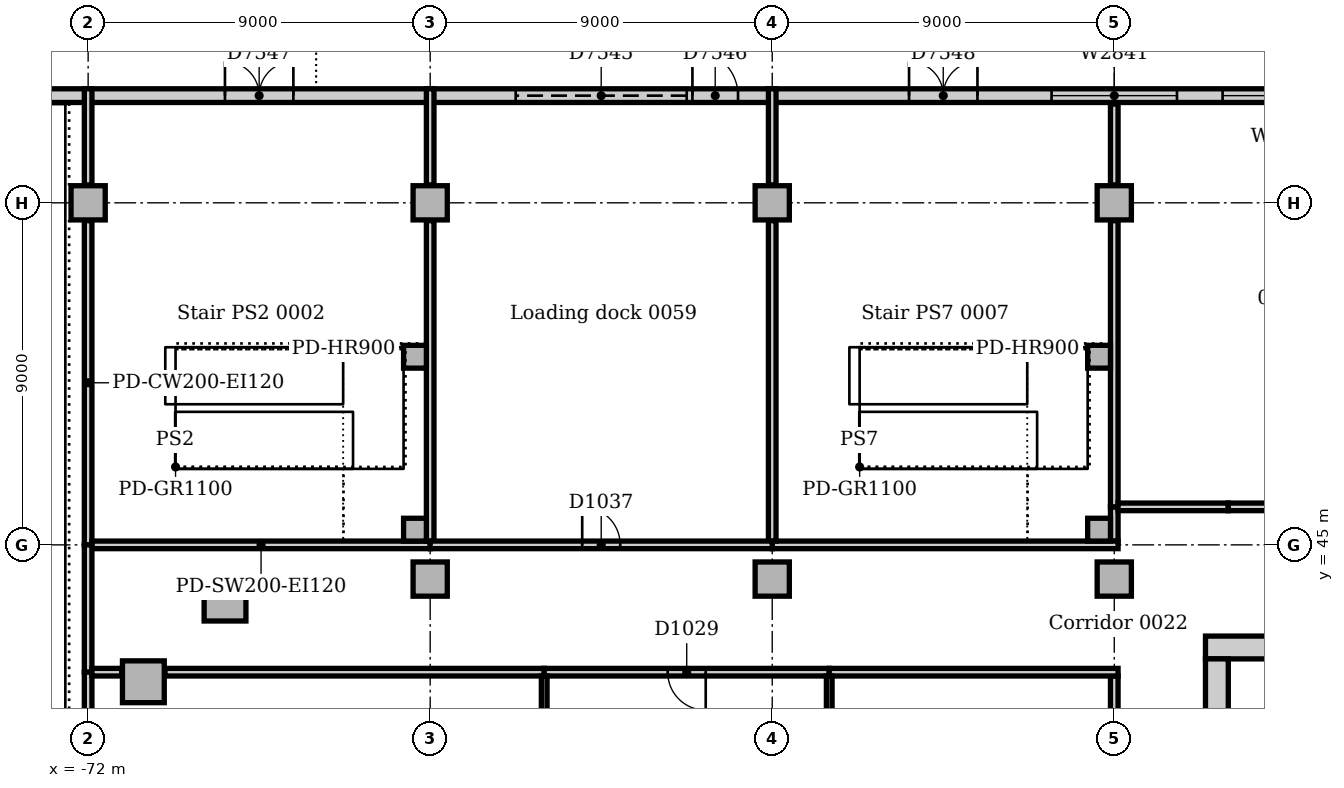
"""IFC4 building model, lengths in metres.
Left out: names, types, materials, properties, quantities, classifications, styles, units other than length and angle.
Written with IfcOpenShell. Run it as: python <this file> out.ifc"""

import sys

from ifc_helpers import new_model, si_unit, direction, frame, frame_2d, origin, origin_2d, place, context, subcontext, project, spatial, rectangle, extrude, element, fill, save


model = new_model("IFC4")
c1 = context("Model", 3, precision=1e-05, world=origin(), true_north=direction((0.0, 1.0)))
c2 = subcontext(c1, "Body", "Model", "MODEL_VIEW")
j1 = project(units=[si_unit("LENGTHUNIT", "METRE"), si_unit("PLANEANGLEUNIT", "RADIAN")], contexts=[c1])
p1 = place(None, origin())
s1 = spatial("IfcSite", under=j1, at=p1, CompositionType="ELEMENT")
p2 = place(p1, origin())
s2 = spatial("IfcBuilding", under=s1, at=p2, CompositionType="ELEMENT")
p3 = place(p2, origin())
s3 = spatial("IfcBuildingStorey", under=s2, at=p3, CompositionType="ELEMENT", Elevation=0.0)
p4 = place(p3, frame((-30.9, 42.3, 0.0), z_axis=(0.0, 0.0, 1.0), x_axis=(-1.0, 0.0, 0.0)))
e1 = element("IfcWall", 1, at=p4, inside=s3, PredefinedType="SOLIDWALL", context=c2, shape_type="SweptSolid", body=[
    extrude(rectangle(XDim=11.7, YDim=0.6, at=frame_2d((5.85, 0.0))), origin(), (0.0, 0.0, 1.0), 6.0),
])
p5 = place(p3, frame((-42.3, 42.0, 0.0), z_axis=(0.0, 0.0, 1.0), x_axis=(0.0, -1.0, 0.0)))
e2 = element("IfcWall", 2, at=p5, inside=s3, PredefinedType="SOLIDWALL", context=c2, shape_type="SweptSolid", body=[
    extrude(rectangle(XDim=11.5, YDim=0.6, at=frame_2d((5.75, 0.0))), origin(), (0.0, 0.0, 1.0), 6.0),
])
p6 = place(p5, frame((8.85, 0.0, 0.0)))
e3 = element("IfcOpeningElement", 3, at=p6, cuts=e2, PredefinedType="OPENING", context=c2, shape_type="SweptSolid", body=[
    extrude(rectangle(XDim=1.8, YDim=2.1, at=frame_2d((0.9, 1.05))), frame((0.0, 0.31, 0.0), z_axis=(0.0, -1.0, 0.0), x_axis=(1.0, 0.0, 0.0)), (0.0, 0.0, 1.0), 0.62),
])
for number, where, z_axis, x_axis in (
    (4, (-68.398, 43.547, 0.0), (0.0, 0.0, 1.0), (1.0, 0.0, 0.0)),
    (5, (-70.547, 41.398, 0.0), (0.0, 0.0, 1.0), (1.0, 0.0, 0.0)),
):
    element("IfcColumn", number, at=place(p3, frame(where, z_axis=z_axis, x_axis=x_axis)), inside=s3, PredefinedType="COLUMN", context=c2, shape_type="SweptSolid", body=[
        extrude(rectangle(XDim=1.1, YDim=1.1, at=origin_2d()), origin(), (0.0, 0.0, 1.0), 5.7),
    ])
for number, where, z_axis, x_axis in (
    (6, (-63.0, 44.1, 0.0), (0.0, 0.0, 1.0), (1.0, 0.0, 0.0)),
    (7, (-54.0, 44.1, 0.0), (0.0, 0.0, 1.0), (1.0, 0.0, 0.0)),
    (8, (-45.0, 44.1, 0.0), (0.0, 0.0, 1.0), (1.0, 0.0, 0.0)),
    (9, (-72.0, 54.0, 0.0), (0.0, 0.0, 1.0), (1.0, 0.0, 0.0)),
    (10, (-63.0, 54.0, 0.0), (0.0, 0.0, 1.0), (1.0, 0.0, 0.0)),
    (11, (-54.0, 54.0, 0.0), (0.0, 0.0, 1.0), (1.0, 0.0, 0.0)),
    (12, (-45.0, 54.0, 0.0), (0.0, 0.0, 1.0), (1.0, 0.0, 0.0)),
):
    element("IfcColumn", number, at=place(p3, frame(where, z_axis=z_axis, x_axis=x_axis)), inside=s3, PredefinedType="COLUMN", context=c2, shape_type="SweptSolid", body=[
        extrude(rectangle(XDim=0.9, YDim=0.9, at=origin_2d()), origin(), (0.0, 0.0, 1.0), 5.7),
    ])
p7 = place(p3, frame((3.4, 56.82, 0.0), z_axis=(0.0, 0.0, 1.0), x_axis=(-1.0, 0.0, 0.0)))
e13 = element("IfcWall", 13, at=p7, inside=s3, PredefinedType="STANDARD", context=c2, shape_type="SweptSolid", body=[
    extrude(rectangle(XDim=84.4, YDim=0.36, at=frame_2d((42.2, 0.0))), origin(), (0.0, 0.0, 1.0), 5.7),
])
p8 = place(p7, frame((15.7, 0.0, 0.0)))
e14 = element("IfcOpeningElement", 14, at=p8, cuts=e13, PredefinedType="OPENING", context=c2, shape_type="SweptSolid", body=[
    extrude(rectangle(XDim=2.4, YDim=2.4, at=frame_2d((1.2, 1.2))), frame((0.0, 0.19, 0.0), z_axis=(0.0, -1.0, 0.0), x_axis=(1.0, 0.0, 0.0)), (0.0, 0.0, 1.0), 0.38),
])
p9 = place(p7, frame((76.6, 0.0, 0.0)))
e15 = element("IfcOpeningElement", 15, at=p9, cuts=e13, PredefinedType="OPENING", context=c2, shape_type="SweptSolid", body=[
    extrude(rectangle(XDim=6.6, YDim=4.2, at=frame_2d((3.3, 2.1))), frame((0.0, 0.19, 0.0), z_axis=(0.0, -1.0, 0.0), x_axis=(1.0, 0.0, 0.0)), (0.0, 0.0, 1.0), 0.38),
])
p10 = place(p7, frame((59.65, 0.0, 0.0)))
e16 = element("IfcOpeningElement", 16, at=p10, cuts=e13, PredefinedType="OPENING", context=c2, shape_type="SweptSolid", body=[
    extrude(rectangle(XDim=4.5, YDim=4.2, at=frame_2d((2.25, 2.1))), frame((0.0, 0.19, 0.0), z_axis=(0.0, -1.0, 0.0), x_axis=(1.0, 0.0, 0.0)), (0.0, 0.0, 1.0), 0.38),
])
p11 = place(p7, frame((58.3, 0.0, 0.0)))
e17 = element("IfcOpeningElement", 17, at=p11, cuts=e13, PredefinedType="OPENING", context=c2, shape_type="SweptSolid", body=[
    extrude(rectangle(XDim=1.2, YDim=2.2, at=frame_2d((0.6, 1.1))), frame((0.0, 0.19, 0.0), z_axis=(0.0, -1.0, 0.0), x_axis=(1.0, 0.0, 0.0)), (0.0, 0.0, 1.0), 0.38),
])
p12 = place(p7, frame((70.0, 0.0, 0.0)))
e18 = element("IfcOpeningElement", 18, at=p12, cuts=e13, PredefinedType="OPENING", context=c2, shape_type="SweptSolid", body=[
    extrude(rectangle(XDim=1.8, YDim=2.2, at=frame_2d((0.9, 1.1))), frame((0.0, 0.19, 0.0), z_axis=(0.0, -1.0, 0.0), x_axis=(1.0, 0.0, 0.0)), (0.0, 0.0, 1.0), 0.38),
])
p13 = place(p7, frame((52.0, 0.0, 0.0)))
e19 = element("IfcOpeningElement", 19, at=p13, cuts=e13, PredefinedType="OPENING", context=c2, shape_type="SweptSolid", body=[
    extrude(rectangle(XDim=1.8, YDim=2.2, at=frame_2d((0.9, 1.1))), frame((0.0, 0.19, 0.0), z_axis=(0.0, -1.0, 0.0), x_axis=(1.0, 0.0, 0.0)), (0.0, 0.0, 1.0), 0.38),
])
p14 = place(p7, frame((1.75, 0.0, 0.6)))
e20 = element("IfcOpeningElement", 20, at=p14, cuts=e13, PredefinedType="OPENING", context=c2, shape_type="SweptSolid", body=[
    extrude(rectangle(XDim=3.3, YDim=3.0, at=frame_2d((1.65, 1.5))), frame((0.0, 0.19, 0.0), z_axis=(0.0, -1.0, 0.0), x_axis=(1.0, 0.0, 0.0)), (0.0, 0.0, 1.0), 0.38),
])
p15 = place(p7, frame((6.25, 0.0, 0.6)))
e21 = element("IfcOpeningElement", 21, at=p15, cuts=e13, PredefinedType="OPENING", context=c2, shape_type="SweptSolid", body=[
    extrude(rectangle(XDim=3.3, YDim=3.0, at=frame_2d((1.65, 1.5))), frame((0.0, 0.19, 0.0), z_axis=(0.0, -1.0, 0.0), x_axis=(1.0, 0.0, 0.0)), (0.0, 0.0, 1.0), 0.38),
])
p16 = place(p7, frame((10.75, 0.0, 0.6)))
e22 = element("IfcOpeningElement", 22, at=p16, cuts=e13, PredefinedType="OPENING", context=c2, shape_type="SweptSolid", body=[
    extrude(rectangle(XDim=3.3, YDim=3.0, at=frame_2d((1.65, 1.5))), frame((0.0, 0.19, 0.0), z_axis=(0.0, -1.0, 0.0), x_axis=(1.0, 0.0, 0.0)), (0.0, 0.0, 1.0), 0.38),
])
p17 = place(p7, frame((19.75, 0.0, 0.6)))
e23 = element("IfcOpeningElement", 23, at=p17, cuts=e13, PredefinedType="OPENING", context=c2, shape_type="SweptSolid", body=[
    extrude(rectangle(XDim=3.3, YDim=3.0, at=frame_2d((1.65, 1.5))), frame((0.0, 0.19, 0.0), z_axis=(0.0, -1.0, 0.0), x_axis=(1.0, 0.0, 0.0)), (0.0, 0.0, 1.0), 0.38),
])
p18 = place(p7, frame((24.25, 0.0, 0.6)))
e24 = element("IfcOpeningElement", 24, at=p18, cuts=e13, PredefinedType="OPENING", context=c2, shape_type="SweptSolid", body=[
    extrude(rectangle(XDim=3.3, YDim=3.0, at=frame_2d((1.65, 1.5))), frame((0.0, 0.19, 0.0), z_axis=(0.0, -1.0, 0.0), x_axis=(1.0, 0.0, 0.0)), (0.0, 0.0, 1.0), 0.38),
])
p19 = place(p7, frame((28.75, 0.0, 0.6)))
e25 = element("IfcOpeningElement", 25, at=p19, cuts=e13, PredefinedType="OPENING", context=c2, shape_type="SweptSolid", body=[
    extrude(rectangle(XDim=3.3, YDim=3.0, at=frame_2d((1.65, 1.5))), frame((0.0, 0.19, 0.0), z_axis=(0.0, -1.0, 0.0), x_axis=(1.0, 0.0, 0.0)), (0.0, 0.0, 1.0), 0.38),
])
p20 = place(p7, frame((33.25, 0.0, 0.6)))
e26 = element("IfcOpeningElement", 26, at=p20, cuts=e13, PredefinedType="OPENING", context=c2, shape_type="SweptSolid", body=[
    extrude(rectangle(XDim=3.3, YDim=3.0, at=frame_2d((1.65, 1.5))), frame((0.0, 0.19, 0.0), z_axis=(0.0, -1.0, 0.0), x_axis=(1.0, 0.0, 0.0)), (0.0, 0.0, 1.0), 0.38),
])
p21 = place(p7, frame((37.75, 0.0, 0.6)))
e27 = element("IfcOpeningElement", 27, at=p21, cuts=e13, PredefinedType="OPENING", context=c2, shape_type="SweptSolid", body=[
    extrude(rectangle(XDim=3.3, YDim=3.0, at=frame_2d((1.65, 1.5))), frame((0.0, 0.19, 0.0), z_axis=(0.0, -1.0, 0.0), x_axis=(1.0, 0.0, 0.0)), (0.0, 0.0, 1.0), 0.38),
])
p22 = place(p7, frame((42.25, 0.0, 0.6)))
e28 = element("IfcOpeningElement", 28, at=p22, cuts=e13, PredefinedType="OPENING", context=c2, shape_type="SweptSolid", body=[
    extrude(rectangle(XDim=3.3, YDim=3.0, at=frame_2d((1.65, 1.5))), frame((0.0, 0.19, 0.0), z_axis=(0.0, -1.0, 0.0), x_axis=(1.0, 0.0, 0.0)), (0.0, 0.0, 1.0), 0.38),
])
p23 = place(p7, frame((46.75, 0.0, 0.6)))
e29 = element("IfcOpeningElement", 29, at=p23, cuts=e13, PredefinedType="OPENING", context=c2, shape_type="SweptSolid", body=[
    extrude(rectangle(XDim=3.3, YDim=3.0, at=frame_2d((1.65, 1.5))), frame((0.0, 0.19, 0.0), z_axis=(0.0, -1.0, 0.0), x_axis=(1.0, 0.0, 0.0)), (0.0, 0.0, 1.0), 0.38),
])
for number, where, z_axis, x_axis in (
    (30, (-63.4, 49.95, 0.0), (0.0, 0.0, 1.0), (1.0, 0.0, 0.0)),
    (31, (-63.4, 45.4, 0.0), (0.0, 0.0, 1.0), (1.0, 0.0, 0.0)),
    (32, (-45.4, 49.95, 0.0), (0.0, 0.0, 1.0), (1.0, 0.0, 0.0)),
    (33, (-45.4, 45.4, 0.0), (0.0, 0.0, 1.0), (1.0, 0.0, 0.0)),
):
    element("IfcColumn", number, at=place(p3, frame(where, z_axis=z_axis, x_axis=x_axis)), inside=s3, PredefinedType="COLUMN", context=c2, shape_type="SweptSolid", body=[
        extrude(rectangle(XDim=0.6, YDim=0.6, at=origin_2d()), origin(), (0.0, 0.0, 1.0), 6.0),
    ])
p24 = place(p3, frame((-72.0, 45.0, 0.0), z_axis=(0.0, 0.0, 1.0), x_axis=(0.0, 1.0, 0.0)))
e34 = element("IfcWall", 34, at=p24, inside=s3, PredefinedType="PARTITIONING", context=c2, shape_type="SweptSolid", body=[
    extrude(rectangle(XDim=8.53, YDim=0.2, at=frame_2d((4.265, 0.0))), origin(), (0.0, 0.0, 1.0), 5.7),
])
p25 = place(p3, frame((-72.0, 54.47, 0.0), z_axis=(0.0, 0.0, 1.0), x_axis=(0.0, 1.0, 0.0)))
e35 = element("IfcWall", 35, at=p25, inside=s3, PredefinedType="PARTITIONING", context=c2, shape_type="SweptSolid", body=[
    extrude(rectangle(XDim=2.53, YDim=0.2, at=frame_2d((1.265, 0.0))), origin(), (0.0, 0.0, 1.0), 5.7),
])
p26 = place(p3, frame((-71.9, 45.0, 0.0), z_axis=(0.0, 0.0, 1.0), x_axis=(1.0, 0.0, 0.0)))
e36 = element("IfcWall", 36, at=p26, inside=s3, PredefinedType="SOLIDWALL", context=c2, shape_type="SweptSolid", body=[
    extrude(rectangle(XDim=8.9, YDim=0.2, at=frame_2d((4.45, 0.0))), origin(), (0.0, 0.0, 1.0), 5.7),
])
p27 = place(p3, frame((-63.0, 45.1, 0.0), z_axis=(0.0, 0.0, 1.0), x_axis=(0.0, 1.0, 0.0)))
e37 = element("IfcWall", 37, at=p27, inside=s3, PredefinedType="SOLIDWALL", context=c2, shape_type="SweptSolid", body=[
    extrude(rectangle(XDim=8.43, YDim=0.2, at=frame_2d((4.215, 0.0))), origin(), (0.0, 0.0, 1.0), 5.7),
])
p28 = place(p3, frame((-63.0, 54.47, 0.0), z_axis=(0.0, 0.0, 1.0), x_axis=(0.0, 1.0, 0.0)))
e38 = element("IfcWall", 38, at=p28, inside=s3, PredefinedType="SOLIDWALL", context=c2, shape_type="SweptSolid", body=[
    extrude(rectangle(XDim=2.53, YDim=0.2, at=frame_2d((1.265, 0.0))), origin(), (0.0, 0.0, 1.0), 5.7),
])
p29 = place(p3, frame((-45.0, 45.1, 0.0), z_axis=(0.0, 0.0, 1.0), x_axis=(0.0, 1.0, 0.0)))
e39 = element("IfcWall", 39, at=p29, inside=s3, PredefinedType="SOLIDWALL", context=c2, shape_type="SweptSolid", body=[
    extrude(rectangle(XDim=0.9, YDim=0.2, at=frame_2d((0.45, 0.0))), origin(), (0.0, 0.0, 1.0), 5.7),
])
p30 = place(p3, frame((-54.0, 45.0, 0.0), z_axis=(0.0, 0.0, 1.0), x_axis=(1.0, 0.0, 0.0)))
e40 = element("IfcWall", 40, at=p30, inside=s3, PredefinedType="SOLIDWALL", context=c2, shape_type="SweptSolid", body=[
    extrude(rectangle(XDim=9.1, YDim=0.2, at=frame_2d((4.55, 0.0))), origin(), (0.0, 0.0, 1.0), 5.7),
])
p31 = place(p3, frame((-54.0, 45.1, 0.0), z_axis=(0.0, 0.0, 1.0), x_axis=(0.0, 1.0, 0.0)))
e41 = element("IfcWall", 41, at=p31, inside=s3, PredefinedType="SOLIDWALL", context=c2, shape_type="SweptSolid", body=[
    extrude(rectangle(XDim=8.43, YDim=0.2, at=frame_2d((4.215, 0.0))), origin(), (0.0, 0.0, 1.0), 5.7),
])
p32 = place(p3, frame((-54.0, 54.47, 0.0), z_axis=(0.0, 0.0, 1.0), x_axis=(0.0, 1.0, 0.0)))
e42 = element("IfcWall", 42, at=p32, inside=s3, PredefinedType="SOLIDWALL", context=c2, shape_type="SweptSolid", body=[
    extrude(rectangle(XDim=2.53, YDim=0.2, at=frame_2d((1.265, 0.0))), origin(), (0.0, 0.0, 1.0), 5.7),
])
p33 = place(p3, frame((-45.0, 46.0, 0.0), z_axis=(0.0, 0.0, 1.0), x_axis=(0.0, 1.0, 0.0)))
e43 = element("IfcWall", 43, at=p33, inside=s3, PredefinedType="SOLIDWALL", context=c2, shape_type="SweptSolid", body=[
    extrude(rectangle(XDim=7.53, YDim=0.2, at=frame_2d((3.765, 0.0))), origin(), (0.0, 0.0, 1.0), 5.7),
])
p34 = place(p3, frame((-45.0, 54.47, 0.0), z_axis=(0.0, 0.0, 1.0), x_axis=(0.0, 1.0, 0.0)))
e44 = element("IfcWall", 44, at=p34, inside=s3, PredefinedType="SOLIDWALL", context=c2, shape_type="SweptSolid", body=[
    extrude(rectangle(XDim=2.13, YDim=0.2, at=frame_2d((1.065, 0.0))), origin(), (0.0, 0.0, 1.0), 5.7),
])
p35 = place(p3, frame((-72.0, 41.65, 0.0), z_axis=(0.0, 0.0, 1.0), x_axis=(0.0, 1.0, 0.0)))
e45 = element("IfcWall", 45, at=p35, inside=s3, PredefinedType="PARTITIONING", context=c2, shape_type="SweptSolid", body=[
    extrude(rectangle(XDim=3.35, YDim=0.2, at=frame_2d((1.675, 0.0))), origin(), (0.0, 0.0, 1.0), 5.7),
])
p36 = place(p3, frame((-72.0, 39.0, 0.0), z_axis=(0.0, 0.0, 1.0), x_axis=(0.0, 1.0, 0.0)))
e46 = element("IfcWall", 46, at=p36, inside=s3, PredefinedType="PARTITIONING", context=c2, shape_type="SweptSolid", body=[
    extrude(rectangle(XDim=2.65, YDim=0.2, at=frame_2d((1.325, 0.0))), origin(), (0.0, 0.0, 1.0), 5.7),
])
p37 = place(p3, frame((-45.0, 36.42, 0.0), z_axis=(0.0, 0.0, 1.0), x_axis=(0.0, 1.0, 0.0)))
e47 = element("IfcWall", 47, at=p37, inside=s3, PredefinedType="PARTITIONING", context=c2, shape_type="SweptSolid", body=[
    extrude(rectangle(XDim=5.13, YDim=0.2, at=frame_2d((2.565, 0.0))), origin(), (0.0, 0.0, 1.0), 5.7),
])
p38 = place(p3, frame((-71.9, 41.65, 0.0), z_axis=(0.0, 0.0, 1.0), x_axis=(1.0, 0.0, 0.0)))
e48 = element("IfcWall", 48, at=p38, inside=s3, PredefinedType="PARTITIONING", context=c2, shape_type="SweptSolid", body=[
    extrude(rectangle(XDim=0.783, YDim=0.2, at=frame_2d((0.392, 0.0))), origin(), (0.0, 0.0, 1.0), 5.7),
])
p39 = place(p3, frame((-69.977, 41.65, 0.0), z_axis=(0.0, 0.0, 1.0), x_axis=(1.0, 0.0, 0.0)))
e49 = element("IfcWall", 49, at=p39, inside=s3, PredefinedType="PARTITIONING", context=c2, shape_type="SweptSolid", body=[
    extrude(rectangle(XDim=9.977, YDim=0.2, at=frame_2d((4.989, 0.0))), origin(), (0.0, 0.0, 1.0), 5.7),
])
p40 = place(p3, frame((-60.0, 41.65, 0.0), z_axis=(0.0, 0.0, 1.0), x_axis=(1.0, 0.0, 0.0)))
e50 = element("IfcWall", 50, at=p40, inside=s3, PredefinedType="PARTITIONING", context=c2, shape_type="SweptSolid", body=[
    extrude(rectangle(XDim=7.5, YDim=0.2, at=frame_2d((3.75, 0.0))), origin(), (0.0, 0.0, 1.0), 5.7),
])
p41 = place(p40, frame((3.25, 0.0, 0.0)))
e51 = element("IfcOpeningElement", 51, at=p41, cuts=e50, PredefinedType="OPENING", context=c2, shape_type="SweptSolid", body=[
    extrude(rectangle(XDim=1.0, YDim=2.1, at=frame_2d((0.5, 1.05))), frame((0.0, 0.11, 0.0), z_axis=(0.0, -1.0, 0.0), x_axis=(1.0, 0.0, 0.0)), (0.0, 0.0, 1.0), 0.22),
])
p42 = place(p3, frame((-52.5, 41.65, 0.0), z_axis=(0.0, 0.0, 1.0), x_axis=(1.0, 0.0, 0.0)))
e52 = element("IfcWall", 52, at=p42, inside=s3, PredefinedType="PARTITIONING", context=c2, shape_type="SweptSolid", body=[
    extrude(rectangle(XDim=7.6, YDim=0.2, at=frame_2d((3.8, 0.0))), origin(), (0.0, 0.0, 1.0), 5.7),
])
p43 = place(p3, frame((-63.0, 45.0, 0.0), z_axis=(0.0, 0.0, 1.0), x_axis=(1.0, 0.0, 0.0)))
e53 = element("IfcWall", 53, at=p43, inside=s3, PredefinedType="PARTITIONING", context=c2, shape_type="SweptSolid", body=[
    extrude(rectangle(XDim=9.0, YDim=0.2, at=frame_2d((4.5, 0.0))), origin(), (0.0, 0.0, 1.0), 5.7),
])
p44 = place(p43, frame((4.0, 0.0, 0.0)))
e54 = element("IfcOpeningElement", 54, at=p44, cuts=e53, PredefinedType="OPENING", context=c2, shape_type="SweptSolid", body=[
    extrude(rectangle(XDim=1.0, YDim=2.1, at=frame_2d((0.5, 1.05))), frame((0.0, 0.11, 0.0), z_axis=(0.0, -1.0, 0.0), x_axis=(1.0, 0.0, 0.0)), (0.0, 0.0, 1.0), 0.22),
])
p45 = place(p3, frame((-44.9, 46.0, 0.0), z_axis=(0.0, 0.0, 1.0), x_axis=(1.0, 0.0, 0.0)))
e55 = element("IfcWall", 55, at=p45, inside=s3, PredefinedType="PARTITIONING", context=c2, shape_type="SweptSolid", body=[
    extrude(rectangle(XDim=2.9, YDim=0.2, at=frame_2d((1.45, 0.0))), origin(), (0.0, 0.0, 1.0), 5.7),
])
p46 = place(p3, frame((-42.0, 46.0, 0.0), z_axis=(0.0, 0.0, 1.0), x_axis=(1.0, 0.0, 0.0)))
e56 = element("IfcWall", 56, at=p46, inside=s3, PredefinedType="PARTITIONING", context=c2, shape_type="SweptSolid", body=[
    extrude(rectangle(XDim=6.0, YDim=0.2, at=frame_2d((3.0, 0.0))), origin(), (0.0, 0.0, 1.0), 5.7),
])
p47 = place(p46, frame((2.5, 0.0, 0.0)))
e57 = element("IfcOpeningElement", 57, at=p47, cuts=e56, PredefinedType="OPENING", context=c2, shape_type="SweptSolid", body=[
    extrude(rectangle(XDim=1.0, YDim=2.1, at=frame_2d((0.5, 1.05))), frame((0.0, 0.11, 0.0), z_axis=(0.0, -1.0, 0.0), x_axis=(1.0, 0.0, 0.0)), (0.0, 0.0, 1.0), 0.22),
])
for number, where, z_axis, x_axis in (
    (58, (-60.0, 33.75, 0.0), (0.0, 0.0, 1.0), (0.0, 1.0, 0.0)),
    (59, (-52.5, 33.75, 0.0), (0.0, 0.0, 1.0), (0.0, 1.0, 0.0)),
):
    element("IfcWall", number, at=place(p3, frame(where, z_axis=z_axis, x_axis=x_axis)), inside=s3, PredefinedType="PARTITIONING", context=c2, shape_type="SweptSolid", body=[
        extrude(rectangle(XDim=7.8, YDim=0.15, at=frame_2d((3.9, 0.0))), origin(), (0.0, 0.0, 1.0), 5.7),
    ])
p48 = place(p10, origin())
e60 = element("IfcDoor", 60, at=p48, inside=s3, OperationType="ROLLINGUP", PredefinedType="DOOR", context=c2, shape_type="SweptSolid", body=[
    extrude(rectangle(XDim=4.5, YDim=4.2, at=frame_2d((2.25, 2.1))), frame((0.0, 0.12, 0.0), z_axis=(0.0, -1.0, 0.0), x_axis=(1.0, 0.0, 0.0)), (0.0, 0.0, 1.0), 0.05),
])
fill(e16, e60)
p49 = place(p11, frame((1.2, 0.0, 0.0), z_axis=(0.0, 0.0, 1.0), x_axis=(-1.0, 0.0, 0.0)))
e61 = element("IfcDoor", 61, at=p49, inside=s3, OperationType="SINGLE_SWING_LEFT", PredefinedType="DOOR", context=c2, shape_type="SweptSolid", body=[
    extrude(rectangle(XDim=1.2, YDim=2.2, at=frame_2d((0.6, 1.1))), frame((0.0, -0.07, 0.0), z_axis=(0.0, -1.0, 0.0), x_axis=(1.0, 0.0, 0.0)), (0.0, 0.0, 1.0), 0.05),
])
fill(e17, e61)
p50 = place(p12, frame((1.8, 0.0, 0.0), z_axis=(0.0, 0.0, 1.0), x_axis=(-1.0, 0.0, 0.0)))
e62 = element("IfcDoor", 62, at=p50, inside=s3, OperationType="DOUBLE_DOOR_SINGLE_SWING", PredefinedType="DOOR", context=c2, shape_type="SweptSolid", body=[
    extrude(rectangle(XDim=1.8, YDim=2.2, at=frame_2d((0.9, 1.1))), frame((0.0, -0.07, 0.0), z_axis=(0.0, -1.0, 0.0), x_axis=(1.0, 0.0, 0.0)), (0.0, 0.0, 1.0), 0.05),
])
fill(e18, e62)
p51 = place(p13, frame((1.8, 0.0, 0.0), z_axis=(0.0, 0.0, 1.0), x_axis=(-1.0, 0.0, 0.0)))
e63 = element("IfcDoor", 63, at=p51, inside=s3, OperationType="DOUBLE_DOOR_SINGLE_SWING", PredefinedType="DOOR", context=c2, shape_type="SweptSolid", body=[
    extrude(rectangle(XDim=1.8, YDim=2.2, at=frame_2d((0.9, 1.1))), frame((0.0, -0.07, 0.0), z_axis=(0.0, -1.0, 0.0), x_axis=(1.0, 0.0, 0.0)), (0.0, 0.0, 1.0), 0.05),
])
fill(e19, e63)
p52 = place(p22, origin())
e64 = element("IfcWindow", 64, at=p52, inside=s3, PartitioningType="SINGLE_PANEL", PredefinedType="WINDOW", context=c2, shape_type="SweptSolid", body=[
    extrude(rectangle(XDim=3.3, YDim=3.0, at=frame_2d((1.65, 1.5))), frame((0.0, 0.13, 0.0), z_axis=(0.0, -1.0, 0.0), x_axis=(1.0, 0.0, 0.0)), (0.0, 0.0, 1.0), 0.06),
])
fill(e28, e64)
p53 = place(p23, origin())
e65 = element("IfcWindow", 65, at=p53, inside=s3, PartitioningType="SINGLE_PANEL", PredefinedType="WINDOW", context=c2, shape_type="SweptSolid", body=[
    extrude(rectangle(XDim=3.3, YDim=3.0, at=frame_2d((1.65, 1.5))), frame((0.0, 0.13, 0.0), z_axis=(0.0, -1.0, 0.0), x_axis=(1.0, 0.0, 0.0)), (0.0, 0.0, 1.0), 0.06),
])
fill(e29, e65)
p54 = place(p41, frame((1.0, 0.0, 0.0), z_axis=(0.0, 0.0, 1.0), x_axis=(-1.0, 0.0, 0.0)))
e66 = element("IfcDoor", 66, at=p54, inside=s3, OperationType="SINGLE_SWING_LEFT", PredefinedType="DOOR", context=c2, shape_type="SweptSolid", body=[
    extrude(rectangle(XDim=1.0, YDim=2.1, at=frame_2d((0.5, 1.05))), frame((0.0, 0.025, 0.0), z_axis=(0.0, -1.0, 0.0), x_axis=(1.0, 0.0, 0.0)), (0.0, 0.0, 1.0), 0.05),
])
fill(e51, e66)
p55 = place(p44, origin())
e67 = element("IfcDoor", 67, at=p55, inside=s3, OperationType="SINGLE_SWING_LEFT", PredefinedType="DOOR", context=c2, shape_type="SweptSolid", body=[
    extrude(rectangle(XDim=1.0, YDim=2.1, at=frame_2d((0.5, 1.05))), frame((0.0, 0.025, 0.0), z_axis=(0.0, -1.0, 0.0), x_axis=(1.0, 0.0, 0.0)), (0.0, 0.0, 1.0), 0.05),
])
fill(e54, e67)
save(model, sys.argv[1])
